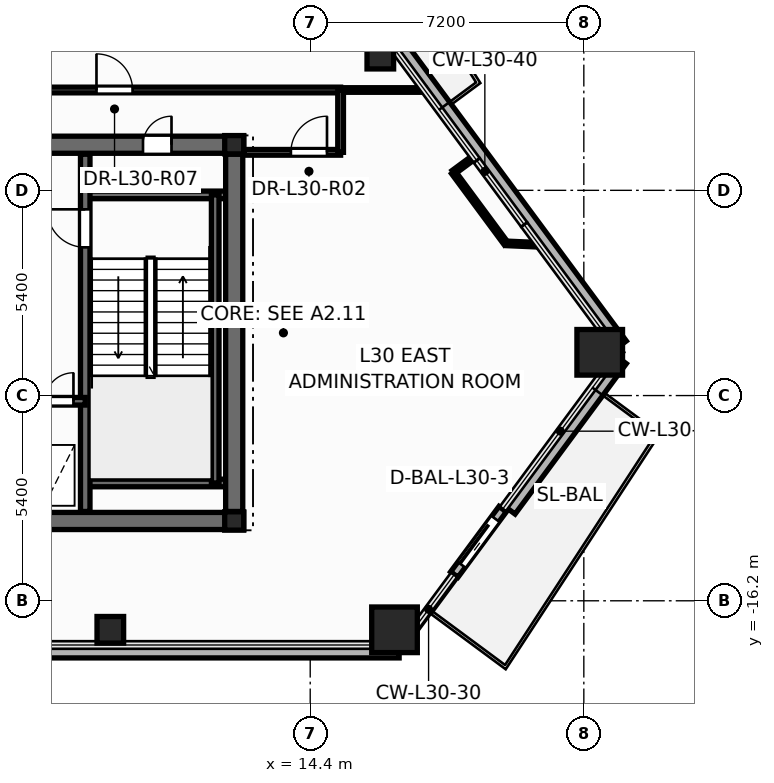
"""IFC4 building model, lengths in metres.
Left out: names, types, materials, properties, quantities, classifications, styles, units other than length and angle.
Written with IfcOpenShell. Run it as: python <this file> out.ifc"""

import sys

from ifc_helpers import new_model, si_unit, direction, frame, frame_2d, origin, origin_2d, place, context, subcontext, project, spatial, rectangle, hollow_rectangle, hollow_circle, i_section, extrude, element, fill, save


model = new_model("IFC4")
c1 = context("Model", 3, precision=1e-05, world=origin(), true_north=direction((0.0, 1.0)))
c2 = subcontext(c1, "Body", "Model", "MODEL_VIEW")
j1 = project(units=[si_unit("LENGTHUNIT", "METRE"), si_unit("PLANEANGLEUNIT", "RADIAN")], contexts=[c1])
p1 = place(None, origin())
s1 = spatial("IfcSite", under=j1, at=p1, CompositionType="ELEMENT")
p2 = place(p1, origin())
s2 = spatial("IfcBuilding", under=s1, at=p2, CompositionType="ELEMENT")
p3 = place(p2, frame((0.0, 0.0, 117.6)))
s3 = spatial("IfcBuildingStorey", under=s2, at=p3, CompositionType="ELEMENT", Elevation=117.6)
for number, where, z_axis, x_axis in (
    (1, (16.618, -16.963, 0.0), (0.0, 0.0, 1.0), (1.0, 0.0, 0.0)),
    (2, (22.019, -9.662, 0.0), (0.0, 0.0, 1.0), (1.0, 0.0, 0.0)),
):
    element("IfcColumn", number, at=place(p3, frame(where, z_axis=z_axis, x_axis=x_axis)), inside=s3, PredefinedType="COLUMN", context=c2, shape_type="SweptSolid", body=[
        extrude(hollow_rectangle(XDim=1.2, YDim=1.2, WallThickness=0.055, at=origin_2d()), origin(), (0.0, 0.0, 1.0), 4.5),
    ])
for number, where, z_axis, x_axis in (
    (3, (9.14, -16.963, 0.0), (0.0, 0.0, 1.0), (1.0, 0.0, 0.0)),
    (4, (16.245, -1.856, 0.0), (0.0, 0.0, 1.0), (1.0, 0.0, 0.0)),
):
    element("IfcColumn", number, at=place(p3, frame(where, z_axis=z_axis, x_axis=x_axis)), inside=s3, PredefinedType="COLUMN", context=c2, shape_type="SweptSolid", body=[
        extrude(hollow_circle(Radius=0.35, WallThickness=0.03, at=origin_2d()), origin(), (0.0, 0.0, 1.0), 4.5),
    ])
for number, where, z_axis, x_axis in (
    (5, (12.4, -14.1, 0.0), (0.0, 0.0, 1.0), (1.0, 0.0, 0.0)),
    (6, (12.4, -4.2, 0.0), (0.0, 0.0, 1.0), (1.0, 0.0, 0.0)),
):
    element("IfcColumn", number, at=place(p3, frame(where, z_axis=z_axis, x_axis=x_axis)), inside=s3, PredefinedType="COLUMN", context=c2, shape_type="SweptSolid", body=[
        extrude(i_section(OverallWidth=0.5, OverallDepth=0.482, WebThickness=0.04, FlangeThickness=0.045, at=origin_2d()), origin(), (0.0, 0.0, 1.0), 4.5),
    ])
p4 = place(p3, frame((-16.74, -17.523, -0.2), z_axis=(0.0, 0.0, 1.0), x_axis=(1.0, 0.0, 0.0)))
e7 = element("IfcWall", 7, at=p4, inside=s3, PredefinedType="PARAPET", context=c2, shape_type="SweptSolid", body=[
    extrude(rectangle(XDim=33.48, YDim=0.36, at=frame_2d((16.74, 0.0))), origin(), (0.0, 0.0, 1.0), 0.38),
])
p5 = place(p3, frame((19.646, -13.811, -0.2), z_axis=(0.0, 0.0, 1.0), x_axis=(0.594629525057, 0.803999830802, 0.0)))
e8 = element("IfcWall", 8, at=p5, inside=s3, PredefinedType="PARAPET", context=c2, shape_type="SweptSolid", body=[
    extrude(rectangle(XDim=4.922, YDim=0.36, at=frame_2d((2.461, 0.0))), origin(), (0.0, 0.0, 1.0), 0.38),
])
p6 = place(p3, frame((22.573, -9.47, -0.2), z_axis=(0.0, 0.0, 1.0), x_axis=(-0.594646075154, 0.803987590268, 0.0)))
e9 = element("IfcWall", 9, at=p6, inside=s3, PredefinedType="PARAPET", context=c2, shape_type="SweptSolid", body=[
    extrude(rectangle(XDim=11.601, YDim=0.36, at=frame_2d((5.8, 0.0))), origin(), (0.0, 0.0, 1.0), 0.38),
])
p7 = place(p3, frame((18.192, -15.509, -0.015), z_axis=(0.0, 0.0, 1.0), x_axis=(0.594638042479, 0.80399353134, 0.0)))
e10 = element("IfcWall", 10, at=p7, inside=s3, PredefinedType="STANDARD", context=c2, shape_type="SweptSolid", body=[
    extrude(rectangle(XDim=2.14, YDim=0.24, at=frame_2d((1.07, 0.0))), origin(), (0.0, 0.0, 1.0), 3.707),
])
p8 = place(p7, frame((0.32, 0.0, 0.015)))
e11 = element("IfcOpeningElement", 11, at=p8, cuts=e10, PredefinedType="OPENING", context=c2, shape_type="SweptSolid", body=[
    extrude(rectangle(XDim=1.506, YDim=2.204, at=frame_2d((0.75, 1.102))), frame((0.0, 0.13, 0.0), z_axis=(0.0, -1.0, 0.0), x_axis=(1.0, 0.0, 0.0)), (0.0, 0.0, 1.0), 0.26),
])
p9 = place(p3, frame((-12.65, -14.1, 0.0), z_axis=(0.0, 0.0, 1.0), x_axis=(1.0, 0.0, 0.0)))
e12 = element("IfcWall", 12, at=p9, inside=s3, PredefinedType="SHEAR", context=c2, shape_type="SweptSolid", body=[
    extrude(rectangle(XDim=25.3, YDim=0.45, at=frame_2d((12.65, 0.0))), origin(), (0.0, 0.0, 1.0), 4.5),
])
p10 = place(p3, frame((-12.65, -4.2, 0.0), z_axis=(0.0, 0.0, 1.0), x_axis=(1.0, 0.0, 0.0)))
e13 = element("IfcWall", 13, at=p10, inside=s3, PredefinedType="SHEAR", context=c2, shape_type="SweptSolid", body=[
    extrude(rectangle(XDim=25.3, YDim=0.45, at=frame_2d((12.65, 0.0))), origin(), (0.0, 0.0, 1.0), 4.5),
])
p11 = place(p10, frame((1.85, 0.0, 0.0)))
e14 = element("IfcOpeningElement", 14, at=p11, cuts=e13, PredefinedType="OPENING", context=c2, shape_type="SweptSolid", body=[
    extrude(rectangle(XDim=0.756, YDim=2.054, at=frame_2d((0.375, 1.027))), frame((0.0, 0.235, 0.0), z_axis=(0.0, -1.0, 0.0), x_axis=(1.0, 0.0, 0.0)), (0.0, 0.0, 1.0), 0.47),
])
p12 = place(p10, frame((22.65, 0.0, 0.0)))
e15 = element("IfcOpeningElement", 15, at=p12, cuts=e13, PredefinedType="OPENING", context=c2, shape_type="SweptSolid", body=[
    extrude(rectangle(XDim=0.756, YDim=2.054, at=frame_2d((0.375, 1.027))), frame((0.0, 0.235, 0.0), z_axis=(0.0, -1.0, 0.0), x_axis=(1.0, 0.0, 0.0)), (0.0, 0.0, 1.0), 0.47),
])
p13 = place(p10, frame((5.85, 0.0, 0.0)))
e16 = element("IfcOpeningElement", 16, at=p13, cuts=e13, PredefinedType="OPENING", context=c2, shape_type="SweptSolid", body=[
    extrude(rectangle(XDim=1.006, YDim=2.104, at=frame_2d((0.5, 1.052))), frame((0.0, 0.235, 0.0), z_axis=(0.0, -1.0, 0.0), x_axis=(1.0, 0.0, 0.0)), (0.0, 0.0, 1.0), 0.47),
])
p14 = place(p10, frame((10.35, 0.0, 0.0)))
e17 = element("IfcOpeningElement", 17, at=p14, cuts=e13, PredefinedType="OPENING", context=c2, shape_type="SweptSolid", body=[
    extrude(rectangle(XDim=1.406, YDim=2.154, at=frame_2d((0.7, 1.077))), frame((0.0, 0.235, 0.0), z_axis=(0.0, -1.0, 0.0), x_axis=(1.0, 0.0, 0.0)), (0.0, 0.0, 1.0), 0.47),
])
p15 = place(p10, frame((18.45, 0.0, 0.0)))
e18 = element("IfcOpeningElement", 18, at=p15, cuts=e13, PredefinedType="OPENING", context=c2, shape_type="SweptSolid", body=[
    extrude(rectangle(XDim=1.006, YDim=2.104, at=frame_2d((0.5, 1.052))), frame((0.0, 0.235, 0.0), z_axis=(0.0, -1.0, 0.0), x_axis=(1.0, 0.0, 0.0)), (0.0, 0.0, 1.0), 0.47),
])
for number, where, z_axis, x_axis in (
    (19, (8.48, -5.52, 0.0), (0.0, 0.0, 1.0), (1.0, 0.0, 0.0)),
    (20, (8.48, -13.1, 0.0), (0.0, 0.0, 1.0), (1.0, 0.0, 0.0)),
):
    element("IfcWall", number, at=place(p3, frame(where, z_axis=z_axis, x_axis=x_axis)), inside=s3, PredefinedType="SOLIDWALL", context=c2, shape_type="SweptSolid", body=[
        extrude(rectangle(XDim=3.87, YDim=0.2, at=frame_2d((1.935, 0.0))), origin(), (0.0, 0.0, 1.0), 4.5),
    ])
p16 = place(p3, frame((11.9, -13.1, 0.0), z_axis=(0.0, 0.0, 1.0), x_axis=(0.0, 1.0, 0.0)))
e21 = element("IfcWall", 21, at=p16, inside=s3, PredefinedType="SOLIDWALL", context=c2, shape_type="SweptSolid", body=[
    extrude(rectangle(XDim=7.58, YDim=0.2, at=frame_2d((3.79, 0.0))), origin(), (0.0, 0.0, 1.0), 4.5),
])
p17 = place(p3, frame((8.48, -13.85, 0.0), z_axis=(0.0, 0.0, 1.0), x_axis=(0.0, 1.0, 0.0)))
e22 = element("IfcWall", 22, at=p17, inside=s3, PredefinedType="SHEAR", context=c2, shape_type="SweptSolid", body=[
    extrude(rectangle(XDim=9.4, YDim=0.25, at=frame_2d((4.7, 0.0))), origin(), (0.0, 0.0, 1.0), 4.5),
])
p18 = place(p17, frame((6.95, 0.0, 0.0)))
e23 = element("IfcOpeningElement", 23, at=p18, cuts=e22, PredefinedType="OPENING", context=c2, shape_type="SweptSolid", body=[
    extrude(rectangle(XDim=1.006, YDim=2.104, at=frame_2d((0.5, 1.052))), frame((0.0, 0.135, 0.0), z_axis=(0.0, -1.0, 0.0), x_axis=(1.0, 0.0, 0.0)), (0.0, 0.0, 1.0), 0.27),
])
p19 = place(p3, frame((5.12, -10.95, 0.0), z_axis=(0.0, 0.0, 1.0), x_axis=(1.0, 0.0, 0.0)))
e24 = element("IfcWall", 24, at=p19, inside=s3, PredefinedType="SOLIDWALL", context=c2, shape_type="SweptSolid", body=[
    extrude(rectangle(XDim=3.36, YDim=0.2, at=frame_2d((1.68, 0.0))), origin(), (0.0, 0.0, 1.0), 4.5),
])
p20 = place(p19, frame((0.42, 0.0, 0.0)))
e25 = element("IfcOpeningElement", 25, at=p20, cuts=e24, PredefinedType="OPENING", context=c2, shape_type="SweptSolid", body=[
    extrude(rectangle(XDim=1.106, YDim=2.104, at=frame_2d((0.55, 1.052))), frame((0.0, 0.11, 0.0), z_axis=(0.0, -1.0, 0.0), x_axis=(1.0, 0.0, 0.0)), (0.0, 0.0, 1.0), 0.22),
])
p21 = place(p19, frame((2.3, 0.0, 0.0)))
e26 = element("IfcOpeningElement", 26, at=p21, cuts=e24, PredefinedType="OPENING", context=c2, shape_type="SweptSolid", body=[
    extrude(rectangle(XDim=0.756, YDim=2.054, at=frame_2d((0.375, 1.027))), frame((0.0, 0.11, 0.0), z_axis=(0.0, -1.0, 0.0), x_axis=(1.0, 0.0, 0.0)), (0.0, 0.0, 1.0), 0.22),
])
p22 = place(p3, frame((12.4, -13.85, 0.0), z_axis=(0.0, 0.0, 1.0), x_axis=(0.0, 1.0, 0.0)))
e27 = element("IfcWall", 27, at=p22, inside=s3, PredefinedType="SHEAR", context=c2, shape_type="SweptSolid", body=[
    extrude(rectangle(XDim=9.4, YDim=0.45, at=frame_2d((4.7, 0.0))), origin(), (0.0, 0.0, 1.0), 4.5),
])
p23 = place(p3, frame((5.14, -2.76, 0.0), z_axis=(0.0, 0.0, 1.0), x_axis=(1.0, 0.0, 0.0)))
e28 = element("IfcWall", 28, at=p23, inside=s3, PredefinedType="PARTITIONING", context=c2, shape_type="SweptSolid", body=[
    extrude(rectangle(XDim=10.06, YDim=0.15, at=frame_2d((5.03, 0.0))), origin(), (0.0, 0.0, 1.0), 3.225),
])
p24 = place(p23, frame((3.636, 0.0, 0.0)))
e29 = element("IfcOpeningElement", 29, at=p24, cuts=e28, PredefinedType="OPENING", context=c2, shape_type="SweptSolid", body=[
    extrude(rectangle(XDim=0.956, YDim=2.104, at=frame_2d((0.475, 1.052))), frame((0.0, 0.085, 0.0), z_axis=(0.0, -1.0, 0.0), x_axis=(1.0, 0.0, 0.0)), (0.0, 0.0, 1.0), 0.17),
])
p25 = place(p3, frame((12.652, -4.4, 0.0), z_axis=(0.0, 0.0, 1.0), x_axis=(1.0, 0.0, 0.0)))
e30 = element("IfcWall", 30, at=p25, inside=s3, PredefinedType="PARTITIONING", context=c2, shape_type="SweptSolid", body=[
    extrude(rectangle(XDim=2.548, YDim=0.15, at=frame_2d((1.274, 0.0))), origin(), (0.0, 0.0, 1.0), 3.225),
])
p26 = place(p25, frame((1.24, 0.0, 0.0)))
e31 = element("IfcOpeningElement", 31, at=p26, cuts=e30, PredefinedType="OPENING", context=c2, shape_type="SweptSolid", body=[
    extrude(rectangle(XDim=0.956, YDim=2.104, at=frame_2d((0.475, 1.052))), frame((0.0, 0.085, 0.0), z_axis=(0.0, -1.0, 0.0), x_axis=(1.0, 0.0, 0.0)), (0.0, 0.0, 1.0), 0.17),
])
p27 = place(p3, frame((19.55, -6.795, 0.0), z_axis=(0.0, 0.0, 1.0), x_axis=(-0.594589014846, 0.804029790135, 0.0)))
e32 = element("IfcWall", 32, at=p27, inside=s3, PredefinedType="PARTITIONING", context=c2, shape_type="SweptSolid", body=[
    extrude(rectangle(XDim=2.323, YDim=0.12, at=frame_2d((1.162, 0.0))), origin(), (0.0, 0.0, 1.0), 4.25),
])
p28 = place(p3, frame((15.2, -2.76, 0.0), z_axis=(0.0, 0.0, 1.0), x_axis=(1.0, 0.0, 0.0)))
e33 = element("IfcWall", 33, at=p28, inside=s3, PredefinedType="PARTITIONING", context=c2, shape_type="SweptSolid", body=[
    extrude(rectangle(XDim=2.211, YDim=0.12, at=frame_2d((1.106, 0.0))), origin(), (0.0, 0.0, 1.0), 3.692),
])
p29 = place(p3, frame((15.2, -4.4, 0.0), z_axis=(0.0, 0.0, 1.0), x_axis=(0.0, 1.0, 0.0)))
e34 = element("IfcWall", 34, at=p29, inside=s3, PredefinedType="PARTITIONING", context=c2, shape_type="SweptSolid", body=[
    extrude(rectangle(XDim=1.64, YDim=0.15, at=frame_2d((0.82, 0.0))), origin(), (0.0, 0.0, 1.0), 4.25),
])
p30 = place(p3, frame((20.411, -6.833, 0.0), z_axis=(0.0, 0.0, 1.0), x_axis=(-0.999048124627, 0.043621607937, 0.0)))
e35 = element("IfcWall", 35, at=p30, inside=s3, PredefinedType="PARTITIONING", context=c2, shape_type="SweptSolid", body=[
    extrude(rectangle(XDim=0.862, YDim=0.12, at=frame_2d((0.431, 0.0))), origin(), (0.0, 0.0, 1.0), 3.692),
])
p31 = place(p3, frame((18.168, -4.927, 0.0), z_axis=(0.0, 0.0, 1.0), x_axis=(0.804092805945, 0.59450379261, 0.0)))
e36 = element("IfcWall", 36, at=p31, inside=s3, PredefinedType="PARTITIONING", context=c2, shape_type="SweptSolid", body=[
    extrude(rectangle(XDim=0.67, YDim=0.12, at=frame_2d((0.335, 0.0))), origin(), (0.0, 0.0, 1.0), 3.692),
])
p32 = place(p8, origin())
e37 = element("IfcDoor", 37, at=p32, inside=s3, OperationType="SLIDING_TO_RIGHT", PredefinedType="DOOR", context=c2, shape_type="SweptSolid", body=[
    extrude(rectangle(XDim=1.5, YDim=2.2, at=frame_2d((0.75, 1.1))), frame((0.0, 0.025, 0.0), z_axis=(0.0, -1.0, 0.0), x_axis=(1.0, 0.0, 0.0)), (0.0, 0.0, 1.0), 0.05),
])
fill(e11, e37)
p33 = place(p18, origin())
e38 = element("IfcDoor", 38, at=p33, inside=s3, OperationType="SINGLE_SWING_RIGHT", PredefinedType="DOOR", context=c2, shape_type="SweptSolid", body=[
    extrude(rectangle(XDim=1.0, YDim=2.1, at=frame_2d((0.5, 1.05))), frame((0.0, 0.025, 0.0), z_axis=(0.0, -1.0, 0.0), x_axis=(1.0, 0.0, 0.0)), (0.0, 0.0, 1.0), 0.05),
])
fill(e23, e38)
p34 = place(p21, origin())
e39 = element("IfcDoor", 39, at=p34, inside=s3, OperationType="SINGLE_SWING_RIGHT", PredefinedType="DOOR", context=c2, shape_type="SweptSolid", body=[
    extrude(rectangle(XDim=0.75, YDim=2.05, at=frame_2d((0.375, 1.025))), frame((0.0, 0.025, 0.0), z_axis=(0.0, -1.0, 0.0), x_axis=(1.0, 0.0, 0.0)), (0.0, 0.0, 1.0), 0.05),
])
fill(e26, e39)
p35 = place(p12, origin())
e40 = element("IfcDoor", 40, at=p35, inside=s3, OperationType="SINGLE_SWING_RIGHT", PredefinedType="DOOR", context=c2, shape_type="SweptSolid", body=[
    extrude(rectangle(XDim=0.75, YDim=2.05, at=frame_2d((0.375, 1.025))), frame((0.0, 0.025, 0.0), z_axis=(0.0, -1.0, 0.0), x_axis=(1.0, 0.0, 0.0)), (0.0, 0.0, 1.0), 0.05),
])
fill(e15, e40)
p36 = place(p26, origin())
e41 = element("IfcDoor", 41, at=p36, inside=s3, OperationType="SINGLE_SWING_RIGHT", PredefinedType="DOOR", context=c2, shape_type="SweptSolid", body=[
    extrude(rectangle(XDim=0.95, YDim=2.1, at=frame_2d((0.475, 1.05))), frame((0.0, 0.025, 0.0), z_axis=(0.0, -1.0, 0.0), x_axis=(1.0, 0.0, 0.0)), (0.0, 0.0, 1.0), 0.05),
])
fill(e31, e41)
p37 = place(p24, origin())
e42 = element("IfcDoor", 42, at=p37, inside=s3, OperationType="SINGLE_SWING_LEFT", PredefinedType="DOOR", context=c2, shape_type="SweptSolid", body=[
    extrude(rectangle(XDim=0.95, YDim=2.1, at=frame_2d((0.475, 1.05))), frame((0.0, 0.025, 0.0), z_axis=(0.0, -1.0, 0.0), x_axis=(1.0, 0.0, 0.0)), (0.0, 0.0, 1.0), 0.05),
])
fill(e29, e42)
save(model, sys.argv[1])
